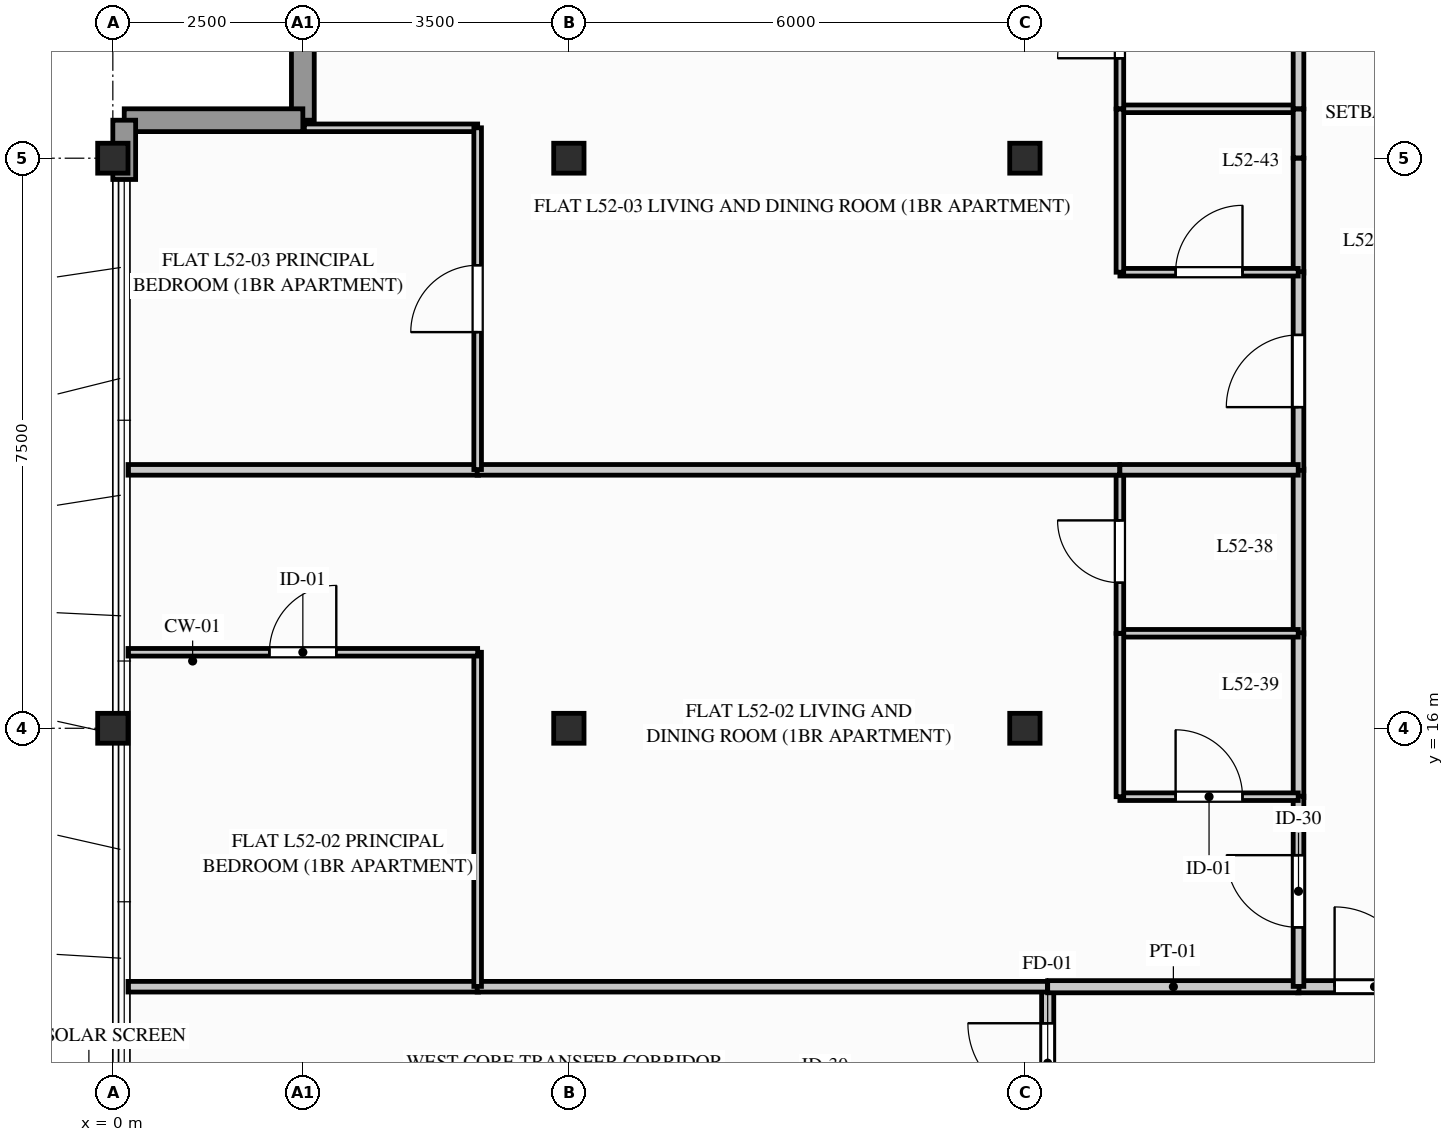
"""IFC4 building model, lengths in metres.
Left out: names, types, materials, properties, quantities, classifications, styles, units other than length and angle.
Written with IfcOpenShell. Run it as: python <this file> out.ifc"""

import sys

from ifc_helpers import new_model, si_unit, direction, frame, frame_2d, origin, origin_2d, place, context, subcontext, project, spatial, rectangle, i_section, extrude, element, fill, save


model = new_model("IFC4")
c1 = context("Model", 3, precision=1e-05, world=origin(), true_north=direction((0.0, 1.0)))
c2 = subcontext(c1, "Body", "Model", "MODEL_VIEW")
j1 = project(units=[si_unit("LENGTHUNIT", "METRE"), si_unit("PLANEANGLEUNIT", "RADIAN")], contexts=[c1])
p1 = place(None, origin())
s1 = spatial("IfcSite", under=j1, at=p1, CompositionType="ELEMENT")
p2 = place(p1, origin())
s2 = spatial("IfcBuilding", under=s1, at=p2, CompositionType="ELEMENT")
p3 = place(p2, frame((0.0, 0.0, 172.8)))
s3 = spatial("IfcBuildingStorey", under=s2, at=p3, CompositionType="ELEMENT", Elevation=172.8)
for number, where, z_axis, x_axis in (
    (1, (0.0, 16.0, 0.0), (0.0, 0.0, 1.0), (1.0, 0.0, 0.0)),
    (2, (0.0, 23.5, 0.0), (0.0, 0.0, 1.0), (1.0, 0.0, 0.0)),
    (3, (6.0, 16.0, 0.0), (0.0, 0.0, 1.0), (1.0, 0.0, 0.0)),
    (4, (6.0, 23.5, 0.0), (0.0, 0.0, 1.0), (1.0, 0.0, 0.0)),
    (5, (12.0, 16.0, 0.0), (0.0, 0.0, 1.0), (1.0, 0.0, 0.0)),
    (6, (12.0, 23.5, 0.0), (0.0, 0.0, 1.0), (1.0, 0.0, 0.0)),
):
    element("IfcColumn", number, at=place(p3, frame(where, z_axis=z_axis, x_axis=x_axis)), inside=s3, PredefinedType="COLUMN", context=c2, shape_type="SweptSolid", body=[
        extrude(i_section(OverallWidth=0.399, OverallDepth=0.394, WebThickness=0.023, FlangeThickness=0.037, FilletRadius=0.015, at=origin_2d()), origin(), (0.0, 0.0, 1.0), 3.1),
    ])
for number, where, z_axis, x_axis in (
    (7, (2.5, 26.35, 0.0), (0.0, 0.0, 1.0), (0.0, -1.0, 0.0)),
    (8, (2.5, 24.0, 0.0), (0.0, 0.0, 1.0), (-1.0, 0.0, 0.0)),
):
    element("IfcWall", number, at=place(p3, frame(where, z_axis=z_axis, x_axis=x_axis)), inside=s3, PredefinedType="STANDARD", context=c2, shape_type="SweptSolid", body=[
        extrude(rectangle(XDim=2.35, YDim=0.3, at=frame_2d((1.175, 0.0))), origin(), (0.0, 0.0, 1.0), 2.89),
    ])
p4 = place(p3, frame((0.15, 24.0, 0.0), z_axis=(0.0, 0.0, 1.0), x_axis=(0.0, -1.0, 0.0)))
e9 = element("IfcWall", 9, at=p4, inside=s3, PredefinedType="STANDARD", context=c2, shape_type="SweptSolid", body=[
    extrude(rectangle(XDim=0.78, YDim=0.3, at=frame_2d((0.39, 0.0))), origin(), (0.0, 0.0, 1.0), 2.89),
])
p5 = place(p3, frame((15.589, 12.6, 0.0), z_axis=(0.0, 0.0, 1.0), x_axis=(1.0, 0.0, 0.0)))
e10 = element("IfcWall", 10, at=p5, inside=s3, PredefinedType="PARTITIONING", context=c2, shape_type="SweptSolid", body=[
    extrude(rectangle(XDim=2.023, YDim=0.16, at=frame_2d((1.011, 0.0))), origin(), (0.0, 0.0, 1.0), 2.89),
])
p6 = place(p5, frame((0.486, 0.0, 0.0)))
e11 = element("IfcOpeningElement", 11, at=p6, cuts=e10, PredefinedType="OPENING", context=c2, shape_type="SweptSolid", body=[
    extrude(rectangle(XDim=1.05, YDim=2.06, at=frame_2d((0.525, 1.03))), frame((0.0, 0.09, 0.0), z_axis=(0.0, -1.0, 0.0), x_axis=(1.0, 0.0, 0.0)), (0.0, 0.0, 1.0), 0.18),
])
p7 = place(p3, frame((12.3, 10.589, 0.0), z_axis=(0.0, 0.0, 1.0), x_axis=(0.0, 1.0, 0.0)))
e12 = element("IfcWall", 12, at=p7, inside=s3, PredefinedType="PARTITIONING", context=c2, shape_type="SweptSolid", body=[
    extrude(rectangle(XDim=2.011, YDim=0.16, at=frame_2d((1.006, 0.0))), origin(), (0.0, 0.0, 1.0), 2.89),
])
p8 = place(p7, frame((0.481, 0.0, 0.0)))
e13 = element("IfcOpeningElement", 13, at=p8, cuts=e12, PredefinedType="OPENING", context=c2, shape_type="SweptSolid", body=[
    extrude(rectangle(XDim=1.05, YDim=2.06, at=frame_2d((0.525, 1.03))), frame((0.0, 0.09, 0.0), z_axis=(0.0, -1.0, 0.0), x_axis=(1.0, 0.0, 0.0)), (0.0, 0.0, 1.0), 0.18),
])
p9 = place(p3, frame((12.3, 12.6, 0.0), z_axis=(0.0, 0.0, 1.0), x_axis=(1.0, 0.0, 0.0)))
e14 = element("IfcWall", 14, at=p9, inside=s3, PredefinedType="PARTITIONING", context=c2, shape_type="SweptSolid", body=[
    extrude(rectangle(XDim=3.307, YDim=0.16, at=frame_2d((1.654, 0.0))), origin(), (0.0, 0.0, 1.0), 2.89),
])
p10 = place(p3, frame((15.6, 17.239, 0.0), z_axis=(0.0, 0.0, 1.0), x_axis=(0.0, 1.0, 0.0)))
e15 = element("IfcWall", 15, at=p10, inside=s3, PredefinedType="PARTITIONING", context=c2, shape_type="SweptSolid", body=[
    extrude(rectangle(XDim=2.173, YDim=0.14, at=frame_2d((1.086, 0.0))), origin(), (0.0, 0.0, 1.0), 2.89),
])
p11 = place(p3, frame((15.6, 15.089, 0.0), z_axis=(0.0, 0.0, 1.0), x_axis=(0.0, 1.0, 0.0)))
e16 = element("IfcWall", 16, at=p11, inside=s3, PredefinedType="PARTITIONING", context=c2, shape_type="SweptSolid", body=[
    extrude(rectangle(XDim=2.169, YDim=0.14, at=frame_2d((1.084, 0.0))), origin(), (0.0, 0.0, 1.0), 2.253),
])
p12 = place(p3, frame((15.6, 12.604, 0.0), z_axis=(0.0, 0.0, 1.0), x_axis=(0.0, 1.0, 0.0)))
e17 = element("IfcWall", 17, at=p12, inside=s3, PredefinedType="PARTITIONING", context=c2, shape_type="SweptSolid", body=[
    extrude(rectangle(XDim=2.503, YDim=0.14, at=frame_2d((1.252, 0.0))), origin(), (0.0, 0.0, 1.0), 2.89),
])
p13 = place(p12, frame((0.777, 0.0, 0.0)))
e18 = element("IfcOpeningElement", 18, at=p13, cuts=e17, PredefinedType="OPENING", context=c2, shape_type="SweptSolid", body=[
    extrude(rectangle(XDim=0.95, YDim=2.05, at=frame_2d((0.475, 1.025))), frame((0.0, 0.08, 0.0), z_axis=(0.0, -1.0, 0.0), x_axis=(1.0, 0.0, 0.0)), (0.0, 0.0, 1.0), 0.16),
])
p14 = place(p3, frame((15.6, 21.989, 0.0), z_axis=(0.0, 0.0, 1.0), x_axis=(0.0, 1.0, 0.0)))
e19 = element("IfcWall", 19, at=p14, inside=s3, PredefinedType="PARTITIONING", context=c2, shape_type="SweptSolid", body=[
    extrude(rectangle(XDim=1.511, YDim=0.14, at=frame_2d((0.756, 0.0))), origin(), (0.0, 0.0, 1.0), 2.253),
])
p15 = place(p3, frame((15.6, 19.393, 0.0), z_axis=(0.0, 0.0, 1.0), x_axis=(0.0, 1.0, 0.0)))
e20 = element("IfcWall", 20, at=p15, inside=s3, PredefinedType="PARTITIONING", context=c2, shape_type="SweptSolid", body=[
    extrude(rectangle(XDim=2.615, YDim=0.14, at=frame_2d((1.307, 0.0))), origin(), (0.0, 0.0, 1.0), 2.562),
])
p16 = place(p15, frame((0.832, 0.0, 0.0)))
e21 = element("IfcOpeningElement", 21, at=p16, cuts=e20, PredefinedType="OPENING", context=c2, shape_type="SweptSolid", body=[
    extrude(rectangle(XDim=0.95, YDim=2.05, at=frame_2d((0.475, 1.025))), frame((0.0, 0.08, 0.0), z_axis=(0.0, -1.0, 0.0), x_axis=(1.0, 0.0, 0.0)), (0.0, 0.0, 1.0), 0.16),
])
p17 = place(p3, frame((0.2, 12.6, 0.0), z_axis=(0.0, 0.0, 1.0), x_axis=(1.0, 0.0, 0.0)))
e22 = element("IfcWall", 22, at=p17, inside=s3, PredefinedType="PARTITIONING", context=c2, shape_type="SweptSolid", body=[
    extrude(rectangle(XDim=4.611, YDim=0.14, at=frame_2d((2.306, 0.0))), origin(), (0.0, 0.0, 1.0), 2.89),
])
p18 = place(p3, frame((4.793, 12.6, 0.0), z_axis=(0.0, 0.0, 1.0), x_axis=(1.0, 0.0, 0.0)))
e23 = element("IfcWall", 23, at=p18, inside=s3, PredefinedType="PARTITIONING", context=c2, shape_type="SweptSolid", body=[
    extrude(rectangle(XDim=7.503, YDim=0.14, at=frame_2d((3.751, 0.0))), origin(), (0.0, 0.0, 1.0), 2.253),
])
p19 = place(p3, frame((13.25, 17.25, 0.0), z_axis=(0.0, 0.0, 1.0), x_axis=(1.0, 0.0, 0.0)))
e24 = element("IfcWall", 24, at=p19, inside=s3, PredefinedType="PARTITIONING", context=c2, shape_type="SweptSolid", body=[
    extrude(rectangle(XDim=2.346, YDim=0.1, at=frame_2d((1.173, 0.0))), origin(), (0.0, 0.0, 1.0), 2.89),
])
p20 = place(p3, frame((13.25, 17.25, 0.0), z_axis=(0.0, 0.0, 1.0), x_axis=(0.0, 1.0, 0.0)))
e25 = element("IfcWall", 25, at=p20, inside=s3, PredefinedType="PARTITIONING", context=c2, shape_type="SweptSolid", body=[
    extrude(rectangle(XDim=2.15, YDim=0.1, at=frame_2d((1.075, 0.0))), origin(), (0.0, 0.0, 1.0), 2.89),
])
p21 = place(p20, frame((0.665, 0.0, 0.0)))
e26 = element("IfcOpeningElement", 26, at=p21, cuts=e25, PredefinedType="OPENING", context=c2, shape_type="SweptSolid", body=[
    extrude(rectangle(XDim=0.82, YDim=2.02, at=frame_2d((0.41, 1.01))), frame((0.0, 0.06, 0.0), z_axis=(0.0, -1.0, 0.0), x_axis=(1.0, 0.0, 0.0)), (0.0, 0.0, 1.0), 0.12),
])
p22 = place(p3, frame((13.25, 19.4, 0.0), z_axis=(0.0, 0.0, 1.0), x_axis=(1.0, 0.0, 0.0)))
e27 = element("IfcWall", 27, at=p22, inside=s3, PredefinedType="PARTITIONING", context=c2, shape_type="SweptSolid", body=[
    extrude(rectangle(XDim=2.346, YDim=0.14, at=frame_2d((1.173, 0.0))), origin(), (0.0, 0.0, 1.0), 2.89),
])
p23 = place(p3, frame((13.25, 15.1, 0.0), z_axis=(0.0, 0.0, 1.0), x_axis=(1.0, 0.0, 0.0)))
e28 = element("IfcWall", 28, at=p23, inside=s3, PredefinedType="PARTITIONING", context=c2, shape_type="SweptSolid", body=[
    extrude(rectangle(XDim=2.346, YDim=0.1, at=frame_2d((1.173, 0.0))), origin(), (0.0, 0.0, 1.0), 2.89),
])
p24 = place(p23, frame((0.733, 0.0, 0.0)))
e29 = element("IfcOpeningElement", 29, at=p24, cuts=e28, PredefinedType="OPENING", context=c2, shape_type="SweptSolid", body=[
    extrude(rectangle(XDim=0.88, YDim=2.04, at=frame_2d((0.44, 1.02))), frame((0.0, 0.06, 0.0), z_axis=(0.0, -1.0, 0.0), x_axis=(1.0, 0.0, 0.0)), (0.0, 0.0, 1.0), 0.12),
])
p25 = place(p3, frame((13.25, 15.1, 0.0), z_axis=(0.0, 0.0, 1.0), x_axis=(0.0, 1.0, 0.0)))
e30 = element("IfcWall", 30, at=p25, inside=s3, PredefinedType="PARTITIONING", context=c2, shape_type="SweptSolid", body=[
    extrude(rectangle(XDim=2.146, YDim=0.1, at=frame_2d((1.073, 0.0))), origin(), (0.0, 0.0, 1.0), 2.253),
])
p26 = place(p3, frame((4.8, 12.604, 0.0), z_axis=(0.0, 0.0, 1.0), x_axis=(0.0, 1.0, 0.0)))
e31 = element("IfcWall", 31, at=p26, inside=s3, PredefinedType="PARTITIONING", context=c2, shape_type="SweptSolid", body=[
    extrude(rectangle(XDim=4.396, YDim=0.1, at=frame_2d((2.198, 0.0))), origin(), (0.0, 0.0, 1.0), 2.253),
])
p27 = place(p3, frame((0.2, 17.0, 0.0), z_axis=(0.0, 0.0, 1.0), x_axis=(1.0, 0.0, 0.0)))
e32 = element("IfcWall", 32, at=p27, inside=s3, PredefinedType="PARTITIONING", context=c2, shape_type="SweptSolid", body=[
    extrude(rectangle(XDim=4.6, YDim=0.1, at=frame_2d((2.3, 0.0))), origin(), (0.0, 0.0, 1.0), 2.89),
])
p28 = place(p27, frame((1.86, 0.0, 0.0)))
e33 = element("IfcOpeningElement", 33, at=p28, cuts=e32, PredefinedType="OPENING", context=c2, shape_type="SweptSolid", body=[
    extrude(rectangle(XDim=0.88, YDim=2.04, at=frame_2d((0.44, 1.02))), frame((0.0, 0.06, 0.0), z_axis=(0.0, -1.0, 0.0), x_axis=(1.0, 0.0, 0.0)), (0.0, 0.0, 1.0), 0.12),
])
p29 = place(p3, frame((0.2, 19.4, 0.0), z_axis=(0.0, 0.0, 1.0), x_axis=(1.0, 0.0, 0.0)))
e34 = element("IfcWall", 34, at=p29, inside=s3, PredefinedType="PARTITIONING", context=c2, shape_type="SweptSolid", body=[
    extrude(rectangle(XDim=4.611, YDim=0.14, at=frame_2d((2.306, 0.0))), origin(), (0.0, 0.0, 1.0), 2.89),
])
p30 = place(p3, frame((4.793, 19.4, 0.0), z_axis=(0.0, 0.0, 1.0), x_axis=(1.0, 0.0, 0.0)))
e35 = element("IfcWall", 35, at=p30, inside=s3, PredefinedType="PARTITIONING", context=c2, shape_type="SweptSolid", body=[
    extrude(rectangle(XDim=8.453, YDim=0.14, at=frame_2d((4.227, 0.0))), origin(), (0.0, 0.0, 1.0), 2.253),
])
p31 = place(p3, frame((13.25, 24.15, 0.0), z_axis=(0.0, 0.0, 1.0), x_axis=(1.0, 0.0, 0.0)))
e36 = element("IfcWall", 36, at=p31, inside=s3, PredefinedType="PARTITIONING", context=c2, shape_type="SweptSolid", body=[
    extrude(rectangle(XDim=2.35, YDim=0.1, at=frame_2d((1.175, 0.0))), origin(), (0.0, 0.0, 1.0), 2.89),
])
p32 = place(p3, frame((13.25, 24.15, 0.0), z_axis=(0.0, 0.0, 1.0), x_axis=(0.0, 1.0, 0.0)))
e37 = element("IfcWall", 37, at=p32, inside=s3, PredefinedType="PARTITIONING", context=c2, shape_type="SweptSolid", body=[
    extrude(rectangle(XDim=2.15, YDim=0.1, at=frame_2d((1.075, 0.0))), origin(), (0.0, 0.0, 1.0), 2.89),
])
p33 = place(p32, frame((0.665, 0.0, 0.0)))
e38 = element("IfcOpeningElement", 38, at=p33, cuts=e37, PredefinedType="OPENING", context=c2, shape_type="SweptSolid", body=[
    extrude(rectangle(XDim=0.82, YDim=2.02, at=frame_2d((0.41, 1.01))), frame((0.0, 0.06, 0.0), z_axis=(0.0, -1.0, 0.0), x_axis=(1.0, 0.0, 0.0)), (0.0, 0.0, 1.0), 0.12),
])
p34 = place(p3, frame((15.6, 24.15, 0.0), z_axis=(0.0, 0.0, 1.0), x_axis=(0.0, 1.0, 0.0)))
e39 = element("IfcWall", 39, at=p34, inside=s3, PredefinedType="PARTITIONING", context=c2, shape_type="SweptSolid", body=[
    extrude(rectangle(XDim=0.961, YDim=0.14, at=frame_2d((0.481, 0.0))), origin(), (0.0, 0.0, 1.0), 2.89),
])
p35 = place(p3, frame((13.25, 22.0, 0.0), z_axis=(0.0, 0.0, 1.0), x_axis=(1.0, 0.0, 0.0)))
e40 = element("IfcWall", 40, at=p35, inside=s3, PredefinedType="PARTITIONING", context=c2, shape_type="SweptSolid", body=[
    extrude(rectangle(XDim=2.346, YDim=0.1, at=frame_2d((1.173, 0.0))), origin(), (0.0, 0.0, 1.0), 2.89),
])
p36 = place(p35, frame((0.733, 0.0, 0.0)))
e41 = element("IfcOpeningElement", 41, at=p36, cuts=e40, PredefinedType="OPENING", context=c2, shape_type="SweptSolid", body=[
    extrude(rectangle(XDim=0.88, YDim=2.04, at=frame_2d((0.44, 1.02))), frame((0.0, 0.06, 0.0), z_axis=(0.0, -1.0, 0.0), x_axis=(1.0, 0.0, 0.0)), (0.0, 0.0, 1.0), 0.12),
])
p37 = place(p3, frame((13.25, 22.0, 0.0), z_axis=(0.0, 0.0, 1.0), x_axis=(0.0, 1.0, 0.0)))
e42 = element("IfcWall", 42, at=p37, inside=s3, PredefinedType="PARTITIONING", context=c2, shape_type="SweptSolid", body=[
    extrude(rectangle(XDim=2.146, YDim=0.1, at=frame_2d((1.073, 0.0))), origin(), (0.0, 0.0, 1.0), 2.253),
])
p38 = place(p3, frame((15.6, 23.504, 0.0), z_axis=(0.0, 0.0, 1.0), x_axis=(0.0, 1.0, 0.0)))
e43 = element("IfcWall", 43, at=p38, inside=s3, PredefinedType="PARTITIONING", context=c2, shape_type="SweptSolid", body=[
    extrude(rectangle(XDim=0.642, YDim=0.14, at=frame_2d((0.321, 0.0))), origin(), (0.0, 0.0, 1.0), 2.253),
])
p39 = place(p3, frame((2.52, 23.9, 0.0), z_axis=(0.0, 0.0, 1.0), x_axis=(1.0, 0.0, 0.0)))
e44 = element("IfcWall", 44, at=p39, inside=s3, PredefinedType="PARTITIONING", context=c2, shape_type="SweptSolid", body=[
    extrude(rectangle(XDim=2.28, YDim=0.1, at=frame_2d((1.14, 0.0))), origin(), (0.0, 0.0, 1.0), 2.89),
])
p40 = place(p3, frame((4.8, 19.404, 0.0), z_axis=(0.0, 0.0, 1.0), x_axis=(0.0, 1.0, 0.0)))
e45 = element("IfcWall", 45, at=p40, inside=s3, PredefinedType="PARTITIONING", context=c2, shape_type="SweptSolid", body=[
    extrude(rectangle(XDim=4.496, YDim=0.1, at=frame_2d((2.248, 0.0))), origin(), (0.0, 0.0, 1.0), 2.253),
])
p41 = place(p40, frame((1.808, 0.0, 0.0)))
e46 = element("IfcOpeningElement", 46, at=p41, cuts=e45, PredefinedType="OPENING", context=c2, shape_type="SweptSolid", body=[
    extrude(rectangle(XDim=0.88, YDim=2.04, at=frame_2d((0.44, 1.02))), frame((0.0, 0.06, 0.0), z_axis=(0.0, -1.0, 0.0), x_axis=(1.0, 0.0, 0.0)), (0.0, 0.0, 1.0), 0.12),
])
p42 = place(p6, origin())
e47 = element("IfcDoor", 47, at=p42, inside=s3, OperationType="SINGLE_SWING_LEFT", PredefinedType="DOOR", context=c2, shape_type="SweptSolid", body=[
    extrude(rectangle(XDim=1.05, YDim=2.06, at=frame_2d((0.525, 1.03))), frame((0.0, 0.025, 0.0), z_axis=(0.0, -1.0, 0.0), x_axis=(1.0, 0.0, 0.0)), (0.0, 0.0, 1.0), 0.05),
])
fill(e11, e47)
p43 = place(p8, origin())
e48 = element("IfcDoor", 48, at=p43, inside=s3, OperationType="SINGLE_SWING_RIGHT", PredefinedType="DOOR", context=c2, shape_type="SweptSolid", body=[
    extrude(rectangle(XDim=1.05, YDim=2.06, at=frame_2d((0.525, 1.03))), frame((0.0, 0.025, 0.0), z_axis=(0.0, -1.0, 0.0), x_axis=(1.0, 0.0, 0.0)), (0.0, 0.0, 1.0), 0.05),
])
fill(e13, e48)
p44 = place(p13, origin())
e49 = element("IfcDoor", 49, at=p44, inside=s3, OperationType="SINGLE_SWING_RIGHT", PredefinedType="DOOR", context=c2, shape_type="SweptSolid", body=[
    extrude(rectangle(XDim=0.95, YDim=2.05, at=frame_2d((0.475, 1.025))), frame((0.0, 0.025, 0.0), z_axis=(0.0, -1.0, 0.0), x_axis=(1.0, 0.0, 0.0)), (0.0, 0.0, 1.0), 0.05),
])
fill(e18, e49)
p45 = place(p16, origin())
e50 = element("IfcDoor", 50, at=p45, inside=s3, OperationType="SINGLE_SWING_LEFT", PredefinedType="DOOR", context=c2, shape_type="SweptSolid", body=[
    extrude(rectangle(XDim=0.95, YDim=2.05, at=frame_2d((0.475, 1.025))), frame((0.0, 0.025, 0.0), z_axis=(0.0, -1.0, 0.0), x_axis=(1.0, 0.0, 0.0)), (0.0, 0.0, 1.0), 0.05),
])
fill(e21, e50)
p46 = place(p21, origin())
e51 = element("IfcDoor", 51, at=p46, inside=s3, OperationType="SINGLE_SWING_RIGHT", PredefinedType="DOOR", context=c2, shape_type="SweptSolid", body=[
    extrude(rectangle(XDim=0.82, YDim=2.02, at=frame_2d((0.41, 1.01))), frame((0.0, 0.025, 0.0), z_axis=(0.0, -1.0, 0.0), x_axis=(1.0, 0.0, 0.0)), (0.0, 0.0, 1.0), 0.05),
])
fill(e26, e51)
p47 = place(p24, origin())
e52 = element("IfcDoor", 52, at=p47, inside=s3, OperationType="SINGLE_SWING_LEFT", PredefinedType="DOOR", context=c2, shape_type="SweptSolid", body=[
    extrude(rectangle(XDim=0.88, YDim=2.04, at=frame_2d((0.44, 1.02))), frame((0.0, 0.025, 0.0), z_axis=(0.0, -1.0, 0.0), x_axis=(1.0, 0.0, 0.0)), (0.0, 0.0, 1.0), 0.05),
])
fill(e29, e52)
p48 = place(p28, origin())
e53 = element("IfcDoor", 53, at=p48, inside=s3, OperationType="SINGLE_SWING_RIGHT", PredefinedType="DOOR", context=c2, shape_type="SweptSolid", body=[
    extrude(rectangle(XDim=0.88, YDim=2.04, at=frame_2d((0.44, 1.02))), frame((0.0, 0.025, 0.0), z_axis=(0.0, -1.0, 0.0), x_axis=(1.0, 0.0, 0.0)), (0.0, 0.0, 1.0), 0.05),
])
fill(e33, e53)
p49 = place(p33, origin())
e54 = element("IfcDoor", 54, at=p49, inside=s3, OperationType="SINGLE_SWING_LEFT", PredefinedType="DOOR", context=c2, shape_type="SweptSolid", body=[
    extrude(rectangle(XDim=0.82, YDim=2.02, at=frame_2d((0.41, 1.01))), frame((0.0, 0.025, 0.0), z_axis=(0.0, -1.0, 0.0), x_axis=(1.0, 0.0, 0.0)), (0.0, 0.0, 1.0), 0.05),
])
fill(e38, e54)
p50 = place(p36, origin())
e55 = element("IfcDoor", 55, at=p50, inside=s3, OperationType="SINGLE_SWING_RIGHT", PredefinedType="DOOR", context=c2, shape_type="SweptSolid", body=[
    extrude(rectangle(XDim=0.88, YDim=2.04, at=frame_2d((0.44, 1.02))), frame((0.0, 0.025, 0.0), z_axis=(0.0, -1.0, 0.0), x_axis=(1.0, 0.0, 0.0)), (0.0, 0.0, 1.0), 0.05),
])
fill(e41, e55)
p51 = place(p41, origin())
e56 = element("IfcDoor", 56, at=p51, inside=s3, OperationType="SINGLE_SWING_LEFT", PredefinedType="DOOR", context=c2, shape_type="SweptSolid", body=[
    extrude(rectangle(XDim=0.88, YDim=2.04, at=frame_2d((0.44, 1.02))), frame((0.0, 0.025, 0.0), z_axis=(0.0, -1.0, 0.0), x_axis=(1.0, 0.0, 0.0)), (0.0, 0.0, 1.0), 0.05),
])
fill(e46, e56)
save(model, sys.argv[1])
